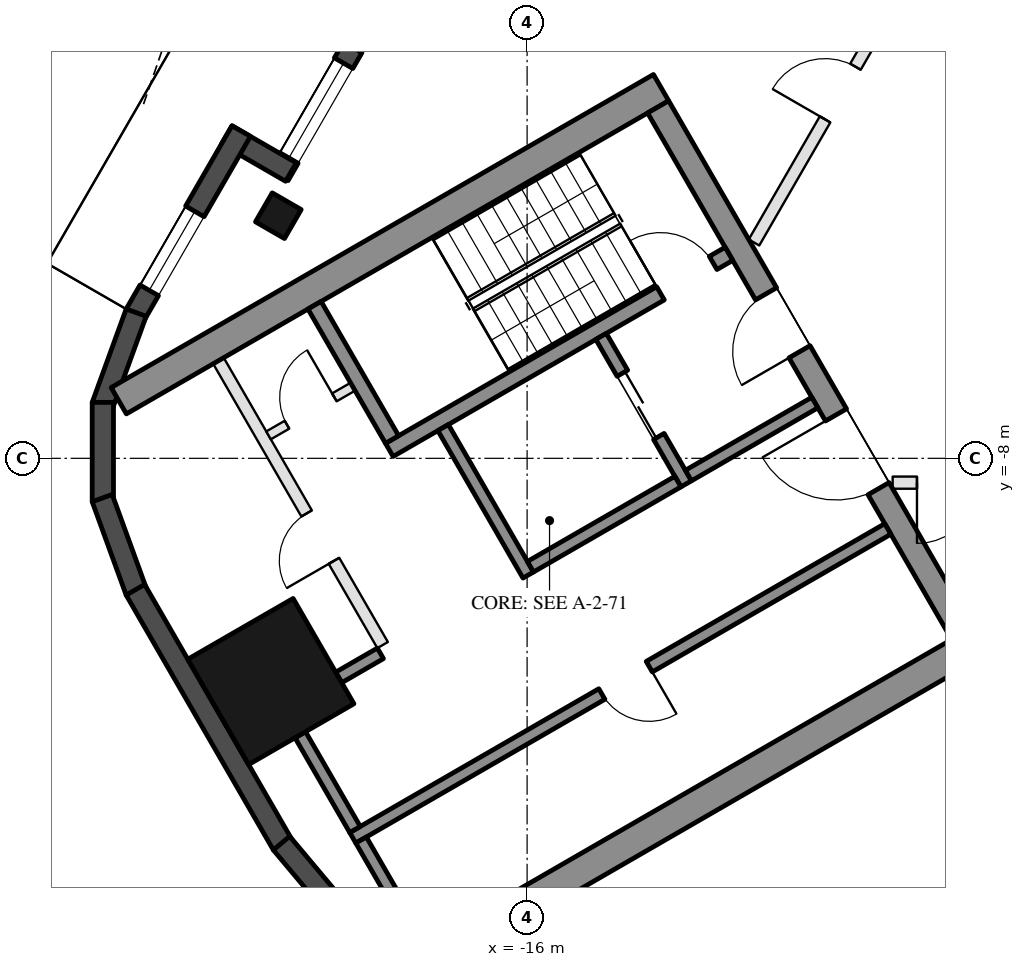
"""IFC4 building model, lengths in metres.
Left out: names, types, materials, properties, quantities, classifications, styles, units other than length and angle.
Written with IfcOpenShell. Run it as: python <this file> out.ifc"""

import sys

from ifc_helpers import new_model, si_unit, direction, frame, frame_2d, origin, origin_2d, place, context, subcontext, project, spatial, rectangle, hollow_rectangle, extrude, boolean, halfspace, element, fill, save


model = new_model("IFC4")
c1 = context("Model", 3, precision=1e-05, world=origin(), true_north=direction((0.0, 1.0)))
c2 = subcontext(c1, "Body", "Model", "MODEL_VIEW")
j1 = project(units=[si_unit("LENGTHUNIT", "METRE"), si_unit("PLANEANGLEUNIT", "RADIAN")], contexts=[c1])
p1 = place(None, origin())
s1 = spatial("IfcSite", under=j1, at=p1, CompositionType="ELEMENT")
p2 = place(p1, origin())
s2 = spatial("IfcBuilding", under=s1, at=p2, CompositionType="ELEMENT")
p3 = place(p2, frame((0.0, 0.0, 305.9)))
s3 = spatial("IfcBuildingStorey", under=s2, at=p3, CompositionType="ELEMENT", Elevation=305.9)
p4 = place(p3, frame((-20.091, -4.01, 0.0), z_axis=(0.0, 0.0, 1.0), x_axis=(0.5, 0.866025403784, 0.0)))
e1 = element("IfcColumn", 1, at=p4, inside=s3, PredefinedType="COLUMN", context=c2, shape_type="SweptSolid", body=[
    boolean("DIFFERENCE", extrude(hollow_rectangle(XDim=0.55, YDim=0.55, WallThickness=0.025, at=origin_2d()), origin(), (0.0, 0.0, 1.0), 3.7), halfspace(frame((0.0, 0.0, 3.66), z_axis=(0.0, 0.0, 1.0), x_axis=(1.0, 0.0, 0.0)), False)),
])
p5 = place(p3, frame((-20.214, -11.671, 0.0), z_axis=(0.0, 0.0, 1.0), x_axis=(-0.5, 0.866025403784, 0.0)))
e2 = element("IfcColumn", 2, at=p5, inside=s3, PredefinedType="COLUMN", context=c2, shape_type="SweptSolid", body=[
    boolean("DIFFERENCE", extrude(hollow_rectangle(XDim=2.0, YDim=2.0, WallThickness=0.05, at=origin_2d()), origin(), (0.0, 0.0, 1.0), 3.7), halfspace(frame((0.0, 0.0, 3.587), z_axis=(0.0, 0.0, 1.0), x_axis=(1.0, 0.0, 0.0)), False)),
])
p6 = place(p3, frame((-17.283, 1.504, 0.0), z_axis=(0.0, 0.0, 1.0), x_axis=(-0.500008054862, -0.866020753258, 0.0)))
e3 = element("IfcWall", 3, at=p6, inside=s3, PredefinedType="SOLIDWALL", context=c2, shape_type="SweptSolid", body=[
    extrude(rectangle(XDim=5.599, YDim=0.35, at=frame_2d((2.8, 0.0))), origin(), (0.0, 0.0, 1.0), 3.55),
])
p7 = place(p6, frame((0.77, 0.0, 0.0)))
e4 = element("IfcOpeningElement", 4, at=p7, cuts=e3, PredefinedType="OPENING", context=c2, shape_type="SweptSolid", body=[
    extrude(rectangle(XDim=2.4, YDim=2.4, at=frame_2d((1.2, 1.2))), frame((0.0, 0.185, 0.0), z_axis=(0.0, -1.0, 0.0), x_axis=(1.0, 0.0, 0.0)), (0.0, 0.0, 1.0), 0.37),
])
p8 = place(p6, frame((3.47, 0.0, 0.3)))
e5 = element("IfcOpeningElement", 5, at=p8, cuts=e3, PredefinedType="OPENING", context=c2, shape_type="SweptSolid", body=[
    extrude(rectangle(XDim=1.8, YDim=2.65, at=frame_2d((0.9, 1.325))), frame((0.0, 0.185, 0.0), z_axis=(0.0, -1.0, 0.0), x_axis=(1.0, 0.0, 0.0)), (0.0, 0.0, 1.0), 0.37),
])
p9 = place(p3, frame((-19.884, -3.292, 0.0), z_axis=(0.0, 0.0, 1.0), x_axis=(-0.866005645448, 0.500034220881, 0.0)))
e6 = element("IfcWall", 6, at=p9, inside=s3, PredefinedType="SOLIDWALL", context=c2, shape_type="SweptSolid", body=[
    extrude(rectangle(XDim=1.22, YDim=0.35, at=frame_2d((0.61, 0.0))), origin(), (0.0, 0.0, 1.0), 3.55),
])
p10 = place(p3, frame((-20.702, -2.618, 0.0), z_axis=(0.0, 0.0, 1.0), x_axis=(-0.499979528911, -0.866037222451, 0.0)))
e7 = element("IfcWall", 7, at=p10, inside=s3, PredefinedType="SOLIDWALL", context=c2, shape_type="SweptSolid", body=[
    extrude(rectangle(XDim=3.48, YDim=0.35, at=frame_2d((1.74, 0.0))), origin(), (0.0, 0.0, 1.0), 3.55),
])
p11 = place(p10, frame((1.525, 0.0, 0.3)))
e8 = element("IfcOpeningElement", 8, at=p11, cuts=e7, PredefinedType="OPENING", context=c2, shape_type="SweptSolid", body=[
    extrude(rectangle(XDim=1.5, YDim=2.65, at=frame_2d((0.75, 1.325))), frame((0.0, 0.185, 0.0), z_axis=(0.0, -1.0, 0.0), x_axis=(1.0, 0.0, 0.0)), (0.0, 0.0, 1.0), 0.37),
])
for number, where, z_axis, x_axis in (
    (9, (-22.429, -5.604, 0.0), (0.0, 0.0, 1.0), (-0.342, -0.94, 0.0)),
    (10, (-22.977, -7.08, 0.0), (0.0, 0.0, 1.0), (0.0, -1.0, 0.0)),
    (11, (-22.988, -8.654, 0.0), (0.0, 0.0, 1.0), (0.342, -0.94, 0.0)),
):
    element("IfcWall", number, at=place(p3, frame(where, z_axis=z_axis, x_axis=x_axis)), inside=s3, PredefinedType="SOLIDWALL", context=c2, shape_type="SweptSolid", body=[
        extrude(rectangle(XDim=1.634, YDim=0.35, at=frame_2d((0.817, 0.0))), origin(), (0.0, 0.0, 1.0), 3.55),
    ])
p12 = place(p3, frame((-22.442, -10.162, 0.0), z_axis=(0.0, 0.0, 1.0), x_axis=(0.500012048649, -0.866018447382, 0.0)))
e12 = element("IfcWall", 12, at=p12, inside=s3, PredefinedType="SOLIDWALL", context=c2, shape_type="SweptSolid", body=[
    extrude(rectangle(XDim=4.841, YDim=0.35, at=frame_2d((2.42, 0.0))), origin(), (0.0, 0.0, 1.0), 3.55),
])
p13 = place(p3, frame((-20.039, -14.329, 0.0), z_axis=(0.0, 0.0, 1.0), x_axis=(0.642708448155, -0.766110860562, 0.0)))
e13 = element("IfcWall", 13, at=p13, inside=s3, PredefinedType="SOLIDWALL", context=c2, shape_type="SweptSolid", body=[
    extrude(rectangle(XDim=1.634, YDim=0.35, at=frame_2d((0.817, 0.0))), origin(), (0.0, 0.0, 1.0), 3.55),
])
for number, where, z_axis, x_axis in (
    (14, (-13.797, -1.903, 0.0), (0.0, 0.0, 1.0), (-0.866, -0.5, 0.0)),
    (15, (-8.547, -10.997, 0.0), (0.0, 0.0, 1.0), (-0.866, -0.5, 0.0)),
):
    element("IfcWall", number, at=place(p3, frame(where, z_axis=z_axis, x_axis=x_axis)), inside=s3, PredefinedType="SHEAR", context=c2, shape_type="SweptSolid", body=[
        extrude(rectangle(XDim=10.298, YDim=0.5, at=frame_2d((5.149, 0.0))), origin(), (0.0, 0.0, 1.0), 3.5),
    ])
p14 = place(p3, frame((-13.845, -2.22, 0.0), z_axis=(0.0, 0.0, 1.0), x_axis=(0.500004234368, -0.866022959057, 0.0)))
e16 = element("IfcWall", 16, at=p14, inside=s3, PredefinedType="SHEAR", context=c2, shape_type="SweptSolid", body=[
    extrude(rectangle(XDim=10.0, YDim=0.4, at=frame_2d((5.0, 0.0))), origin(), (0.0, 0.0, 1.0), 3.5),
])
p15 = place(p14, frame((3.55, 0.0, 0.0)))
e17 = element("IfcOpeningElement", 17, at=p15, cuts=e16, PredefinedType="OPENING", context=c2, shape_type="SweptSolid", body=[
    extrude(rectangle(XDim=1.1, YDim=2.1, at=frame_2d((0.55, 1.05))), frame((0.0, 0.21, 0.0), z_axis=(0.0, -1.0, 0.0), x_axis=(1.0, 0.0, 0.0)), (0.0, 0.0, 1.0), 0.42),
])
p16 = place(p14, frame((5.85, 0.0, 0.0)))
e18 = element("IfcOpeningElement", 18, at=p16, cuts=e16, PredefinedType="OPENING", context=c2, shape_type="SweptSolid", body=[
    extrude(rectangle(XDim=1.4, YDim=2.1, at=frame_2d((0.7, 1.05))), frame((0.0, 0.21, 0.0), z_axis=(0.0, -1.0, 0.0), x_axis=(1.0, 0.0, 0.0)), (0.0, 0.0, 1.0), 0.42),
])
p17 = place(p3, frame((-12.681, -4.636, 0.0), z_axis=(0.0, 0.0, 1.0), x_axis=(-0.866021702275, -0.500006411147, 0.0)))
e19 = element("IfcWall", 19, at=p17, inside=s3, PredefinedType="SHEAR", context=c2, shape_type="SweptSolid", body=[
    extrude(rectangle(XDim=6.45, YDim=0.25, at=frame_2d((3.225, 0.0))), origin(), (0.0, 0.0, 1.0), 3.5),
])
p18 = place(p17, frame((0.3, 0.0, 0.0)))
e20 = element("IfcOpeningElement", 20, at=p18, cuts=e19, PredefinedType="OPENING", context=c2, shape_type="SweptSolid", body=[
    extrude(rectangle(XDim=1.0, YDim=2.1, at=frame_2d((0.5, 1.05))), frame((0.0, 0.135, 0.0), z_axis=(0.0, -1.0, 0.0), x_axis=(1.0, 0.0, 0.0)), (0.0, 0.0, 1.0), 0.27),
])
p19 = place(p3, frame((-19.496, -5.482, 0.0), z_axis=(0.0, 0.0, 1.0), x_axis=(0.499990435942, -0.866030925526, 0.0)))
e21 = element("IfcWall", 21, at=p19, inside=s3, PredefinedType="SHEAR", context=c2, shape_type="SweptSolid", body=[
    extrude(rectangle(XDim=2.55, YDim=0.25, at=frame_2d((1.275, 0.0))), origin(), (0.0, 0.0, 1.0), 3.5),
])
p20 = place(p3, frame((-17.381, -7.495, 0.0), z_axis=(0.0, 0.0, 1.0), x_axis=(0.500011755427, -0.866018616679, 0.0)))
e22 = element("IfcWall", 22, at=p20, inside=s3, PredefinedType="SHEAR", context=c2, shape_type="SweptSolid", body=[
    extrude(rectangle(XDim=2.8, YDim=0.2, at=frame_2d((1.4, 0.0))), origin(), (0.0, 0.0, 1.0), 3.5),
])
p21 = place(p3, frame((-14.783, -5.995, 0.0), z_axis=(0.0, 0.0, 1.0), x_axis=(0.49994636267, -0.866056369097, 0.0)))
e23 = element("IfcWall", 23, at=p21, inside=s3, PredefinedType="SHEAR", context=c2, shape_type="SweptSolid", body=[
    extrude(rectangle(XDim=2.8, YDim=0.2, at=frame_2d((1.4, 0.0))), origin(), (0.0, 0.0, 1.0), 3.5),
])
p22 = place(p21, frame((0.7, 0.0, 0.0)))
e24 = element("IfcOpeningElement", 24, at=p22, cuts=e23, PredefinedType="OPENING", context=c2, shape_type="SweptSolid", body=[
    extrude(rectangle(XDim=1.2, YDim=2.1, at=frame_2d((0.6, 1.05))), frame((0.0, 0.11, 0.0), z_axis=(0.0, -1.0, 0.0), x_axis=(1.0, 0.0, 0.0)), (0.0, 0.0, 1.0), 0.22),
])
p23 = place(p3, frame((-13.52, -8.383, 0.0), z_axis=(0.0, 0.0, 1.0), x_axis=(-0.866034573852, -0.49998411664, 0.0)))
e25 = element("IfcWall", 25, at=p23, inside=s3, PredefinedType="SHEAR", context=c2, shape_type="SweptSolid", body=[
    extrude(rectangle(XDim=2.8, YDim=0.2, at=frame_2d((1.4, 0.0))), origin(), (0.0, 0.0, 1.0), 3.5),
])
p24 = place(p3, frame((-11.268, -7.083, 0.0), z_axis=(0.0, 0.0, 1.0), x_axis=(-0.866050077142, -0.499957262057, 0.0)))
e26 = element("IfcWall", 26, at=p24, inside=s3, PredefinedType="SHEAR", context=c2, shape_type="SweptSolid", body=[
    extrude(rectangle(XDim=2.4, YDim=0.2, at=frame_2d((1.2, 0.0))), origin(), (0.0, 0.0, 1.0), 3.5),
])
p25 = place(p3, frame((-10.068, -9.162, 0.0), z_axis=(0.0, 0.0, 1.0), x_axis=(-0.866032725843, -0.499987317609, 0.0)))
e27 = element("IfcWall", 27, at=p25, inside=s3, PredefinedType="SHEAR", context=c2, shape_type="SweptSolid", body=[
    extrude(rectangle(XDim=10.16, YDim=0.2, at=frame_2d((5.08, 0.0))), origin(), (0.0, 0.0, 1.0), 3.5),
])
p26 = place(p25, frame((4.53, 0.0, 0.0)))
e28 = element("IfcOpeningElement", 28, at=p26, cuts=e27, PredefinedType="OPENING", context=c2, shape_type="SweptSolid", body=[
    extrude(rectangle(XDim=0.9, YDim=2.1, at=frame_2d((0.45, 1.05))), frame((0.0, 0.11, 0.0), z_axis=(0.0, -1.0, 0.0), x_axis=(1.0, 0.0, 0.0)), (0.0, 0.0, 1.0), 0.22),
])
p27 = place(p3, frame((-19.73, -12.546, 0.0), z_axis=(0.0, 0.0, 1.0), x_axis=(0.500004188491, -0.866022985545, 0.0)))
e29 = element("IfcWall", 29, at=p27, inside=s3, PredefinedType="SHEAR", context=c2, shape_type="SweptSolid", body=[
    extrude(rectangle(XDim=1.8, YDim=0.2, at=frame_2d((0.9, 0.0))), origin(), (0.0, 0.0, 1.0), 3.5),
])
p28 = place(p3, frame((-18.413, -11.208, 0.0), z_axis=(0.0, 0.0, 1.0), x_axis=(-0.86597493103, -0.500087411186, 0.0)))
e30 = element("IfcWall", 30, at=p28, inside=s3, PredefinedType="SHEAR", context=c2, shape_type="SweptSolid", body=[
    extrude(rectangle(XDim=0.791, YDim=0.2, at=frame_2d((0.396, 0.0))), origin(), (0.0, 0.0, 1.0), 3.5),
])
p29 = place(p3, frame((-18.73, -14.278, 0.0), z_axis=(0.0, 0.0, 1.0), x_axis=(0.50002537861, -0.866010750942, 0.0)))
e31 = element("IfcWall", 31, at=p29, inside=s3, PredefinedType="SHEAR", context=c2, shape_type="SweptSolid", body=[
    extrude(rectangle(XDim=2.0, YDim=0.2, at=frame_2d((1.0, 0.0))), origin(), (0.0, 0.0, 1.0), 3.5),
])
p30 = place(p3, frame((-21.076, -6.395, 0.0), z_axis=(0.0, 0.0, 1.0), x_axis=(0.50001468107, -0.866016927499, 0.0)))
e32 = element("IfcWall", 32, at=p30, inside=s3, PredefinedType="PARTITIONING", context=c2, shape_type="SweptSolid", body=[
    extrude(rectangle(XDim=5.4, YDim=0.2, at=frame_2d((2.7, 0.0))), origin(), (0.0, 0.0, 1.0), 3.5),
])
p31 = place(p30, frame((2.9, 0.0, 0.0)))
e33 = element("IfcOpeningElement", 33, at=p31, cuts=e32, PredefinedType="OPENING", context=c2, shape_type="SweptSolid", body=[
    extrude(rectangle(XDim=0.9, YDim=2.1, at=frame_2d((0.45, 1.05))), frame((0.0, 0.11, 0.0), z_axis=(0.0, -1.0, 0.0), x_axis=(1.0, 0.0, 0.0)), (0.0, 0.0, 1.0), 0.22),
])
p32 = place(p3, frame((-18.866, -6.822, 0.0), z_axis=(0.0, 0.0, 1.0), x_axis=(-0.866028054938, -0.499995408039, 0.0)))
e34 = element("IfcWall", 34, at=p32, inside=s3, PredefinedType="PARTITIONING", context=c2, shape_type="SweptSolid", body=[
    extrude(rectangle(XDim=1.6, YDim=0.15, at=frame_2d((0.8, 0.0))), origin(), (0.0, 0.0, 1.0), 3.5),
])
p33 = place(p32, frame((0.35, 0.0, 0.0)))
e35 = element("IfcOpeningElement", 35, at=p33, cuts=e34, PredefinedType="OPENING", context=c2, shape_type="SweptSolid", body=[
    extrude(rectangle(XDim=0.9, YDim=2.1, at=frame_2d((0.45, 1.05))), frame((0.0, 0.085, 0.0), z_axis=(0.0, -1.0, 0.0), x_axis=(1.0, 0.0, 0.0)), (0.0, 0.0, 1.0), 0.17),
])
p34 = place(p3, frame((-6.18, -8.4, 0.0), z_axis=(0.0, 0.0, 1.0), x_axis=(-1.0, 0.0, 0.0)))
e36 = element("IfcWall", 36, at=p34, inside=s3, PredefinedType="PARTITIONING", context=c2, shape_type="SweptSolid", body=[
    extrude(rectangle(XDim=3.809, YDim=0.2, at=frame_2d((1.904, 0.0))), origin(), (0.0, 0.0, 1.0), 3.1),
])
p35 = place(p34, frame((2.409, 0.0, 0.0)))
e37 = element("IfcOpeningElement", 37, at=p35, cuts=e36, PredefinedType="OPENING", context=c2, shape_type="SweptSolid", body=[
    extrude(rectangle(XDim=1.0, YDim=2.1, at=frame_2d((0.5, 1.05))), frame((0.0, 0.11, 0.0), z_axis=(0.0, -1.0, 0.0), x_axis=(1.0, 0.0, 0.0)), (0.0, 0.0, 1.0), 0.22),
])
p36 = place(p3, frame((-12.269, -4.45, 0.0), z_axis=(0.0, 0.0, 1.0), x_axis=(0.50002670742, 0.866009983699, 0.0)))
e38 = element("IfcWall", 38, at=p36, inside=s3, PredefinedType="PARTITIONING", context=c2, shape_type="SweptSolid", body=[
    extrude(rectangle(XDim=5.788, YDim=0.2, at=frame_2d((2.894, 0.0))), origin(), (0.0, 0.0, 1.0), 3.1),
])
p37 = place(p36, frame((2.338, 0.0, 0.0)))
e39 = element("IfcOpeningElement", 39, at=p37, cuts=e38, PredefinedType="OPENING", context=c2, shape_type="SweptSolid", body=[
    extrude(rectangle(XDim=1.0, YDim=2.1, at=frame_2d((0.5, 1.05))), frame((0.0, 0.11, 0.0), z_axis=(0.0, -1.0, 0.0), x_axis=(1.0, 0.0, 0.0)), (0.0, 0.0, 1.0), 0.22),
])
p38 = place(p8, origin())
e40 = element("IfcWindow", 40, at=p38, inside=s3, PartitioningType="SINGLE_PANEL", PredefinedType="WINDOW", context=c2, shape_type="SweptSolid", body=[
    extrude(rectangle(XDim=1.8, YDim=2.65, at=frame_2d((0.9, 1.325))), frame((0.0, 0.03, 0.0), z_axis=(0.0, -1.0, 0.0), x_axis=(1.0, 0.0, 0.0)), (0.0, 0.0, 1.0), 0.06),
])
fill(e5, e40)
p39 = place(p11, origin())
e41 = element("IfcWindow", 41, at=p39, inside=s3, PartitioningType="SINGLE_PANEL", PredefinedType="WINDOW", context=c2, shape_type="SweptSolid", body=[
    extrude(rectangle(XDim=1.5, YDim=2.65, at=frame_2d((0.75, 1.325))), frame((0.0, 0.03, 0.0), z_axis=(0.0, -1.0, 0.0), x_axis=(1.0, 0.0, 0.0)), (0.0, 0.0, 1.0), 0.06),
])
fill(e8, e41)
p40 = place(p22, origin())
e42 = element("IfcDoor", 42, at=p40, inside=s3, OperationType="DOUBLE_DOOR_SLIDING", PredefinedType="DOOR", context=c2, shape_type="SweptSolid", body=[
    extrude(rectangle(XDim=1.2, YDim=2.1, at=frame_2d((0.6, 1.05))), frame((0.0, 0.025, 0.0), z_axis=(0.0, -1.0, 0.0), x_axis=(1.0, 0.0, 0.0)), (0.0, 0.0, 1.0), 0.05),
])
fill(e24, e42)
p41 = place(p33, frame((0.9, 0.0, 0.0), z_axis=(0.0, 0.0, 1.0), x_axis=(-1.0, 0.0, 0.0)))
e43 = element("IfcDoor", 43, at=p41, inside=s3, OperationType="SINGLE_SWING_RIGHT", PredefinedType="DOOR", context=c2, shape_type="SweptSolid", body=[
    extrude(rectangle(XDim=0.9, YDim=2.1, at=frame_2d((0.45, 1.05))), frame((0.0, 0.025, 0.0), z_axis=(0.0, -1.0, 0.0), x_axis=(1.0, 0.0, 0.0)), (0.0, 0.0, 1.0), 0.05),
])
fill(e35, e43)
p42 = place(p26, origin())
e44 = element("IfcDoor", 44, at=p42, inside=s3, OperationType="SINGLE_SWING_LEFT", PredefinedType="DOOR", context=c2, shape_type="SweptSolid", body=[
    extrude(rectangle(XDim=0.9, YDim=2.1, at=frame_2d((0.45, 1.05))), frame((0.0, 0.025, 0.0), z_axis=(0.0, -1.0, 0.0), x_axis=(1.0, 0.0, 0.0)), (0.0, 0.0, 1.0), 0.05),
])
fill(e28, e44)
p43 = place(p31, frame((0.9, 0.0, 0.0), z_axis=(0.0, 0.0, 1.0), x_axis=(-1.0, 0.0, 0.0)))
e45 = element("IfcDoor", 45, at=p43, inside=s3, OperationType="SINGLE_SWING_LEFT", PredefinedType="DOOR", context=c2, shape_type="SweptSolid", body=[
    extrude(rectangle(XDim=0.9, YDim=2.1, at=frame_2d((0.45, 1.05))), frame((0.0, 0.025, 0.0), z_axis=(0.0, -1.0, 0.0), x_axis=(1.0, 0.0, 0.0)), (0.0, 0.0, 1.0), 0.05),
])
fill(e33, e45)
p44 = place(p15, frame((1.1, 0.0, 0.0), z_axis=(0.0, 0.0, 1.0), x_axis=(-1.0, 0.0, 0.0)))
e46 = element("IfcDoor", 46, at=p44, inside=s3, OperationType="SINGLE_SWING_LEFT", PredefinedType="DOOR", context=c2, shape_type="SweptSolid", body=[
    extrude(rectangle(XDim=1.1, YDim=2.1, at=frame_2d((0.55, 1.05))), frame((0.0, 0.025, 0.0), z_axis=(0.0, -1.0, 0.0), x_axis=(1.0, 0.0, 0.0)), (0.0, 0.0, 1.0), 0.05),
])
fill(e17, e46)
p45 = place(p16, frame((1.4, 0.0, 0.0), z_axis=(0.0, 0.0, 1.0), x_axis=(-1.0, 0.0, 0.0)))
e47 = element("IfcDoor", 47, at=p45, inside=s3, OperationType="DOUBLE_DOOR_SINGLE_SWING", PredefinedType="DOOR", context=c2, shape_type="SweptSolid", body=[
    extrude(rectangle(XDim=1.4, YDim=2.1, at=frame_2d((0.7, 1.05))), frame((0.0, 0.025, 0.0), z_axis=(0.0, -1.0, 0.0), x_axis=(1.0, 0.0, 0.0)), (0.0, 0.0, 1.0), 0.05),
])
fill(e18, e47)
p46 = place(p18, frame((1.0, 0.0, 0.0), z_axis=(0.0, 0.0, 1.0), x_axis=(-1.0, 0.0, 0.0)))
e48 = element("IfcDoor", 48, at=p46, inside=s3, OperationType="SINGLE_SWING_LEFT", PredefinedType="DOOR", context=c2, shape_type="SweptSolid", body=[
    extrude(rectangle(XDim=1.0, YDim=2.1, at=frame_2d((0.5, 1.05))), frame((0.0, 0.025, 0.0), z_axis=(0.0, -1.0, 0.0), x_axis=(1.0, 0.0, 0.0)), (0.0, 0.0, 1.0), 0.05),
])
fill(e20, e48)
p47 = place(p35, origin())
e49 = element("IfcDoor", 49, at=p47, inside=s3, OperationType="SINGLE_SWING_RIGHT", PredefinedType="DOOR", context=c2, shape_type="SweptSolid", body=[
    extrude(rectangle(XDim=1.0, YDim=2.1, at=frame_2d((0.5, 1.05))), frame((0.0, 0.025, 0.0), z_axis=(0.0, -1.0, 0.0), x_axis=(1.0, 0.0, 0.0)), (0.0, 0.0, 1.0), 0.05),
])
fill(e37, e49)
p48 = place(p37, origin())
e50 = element("IfcDoor", 50, at=p48, inside=s3, OperationType="SINGLE_SWING_LEFT", PredefinedType="DOOR", context=c2, shape_type="SweptSolid", body=[
    extrude(rectangle(XDim=1.0, YDim=2.1, at=frame_2d((0.5, 1.05))), frame((0.0, 0.025, 0.0), z_axis=(0.0, -1.0, 0.0), x_axis=(1.0, 0.0, 0.0)), (0.0, 0.0, 1.0), 0.05),
])
fill(e39, e50)
save(model, sys.argv[1])
